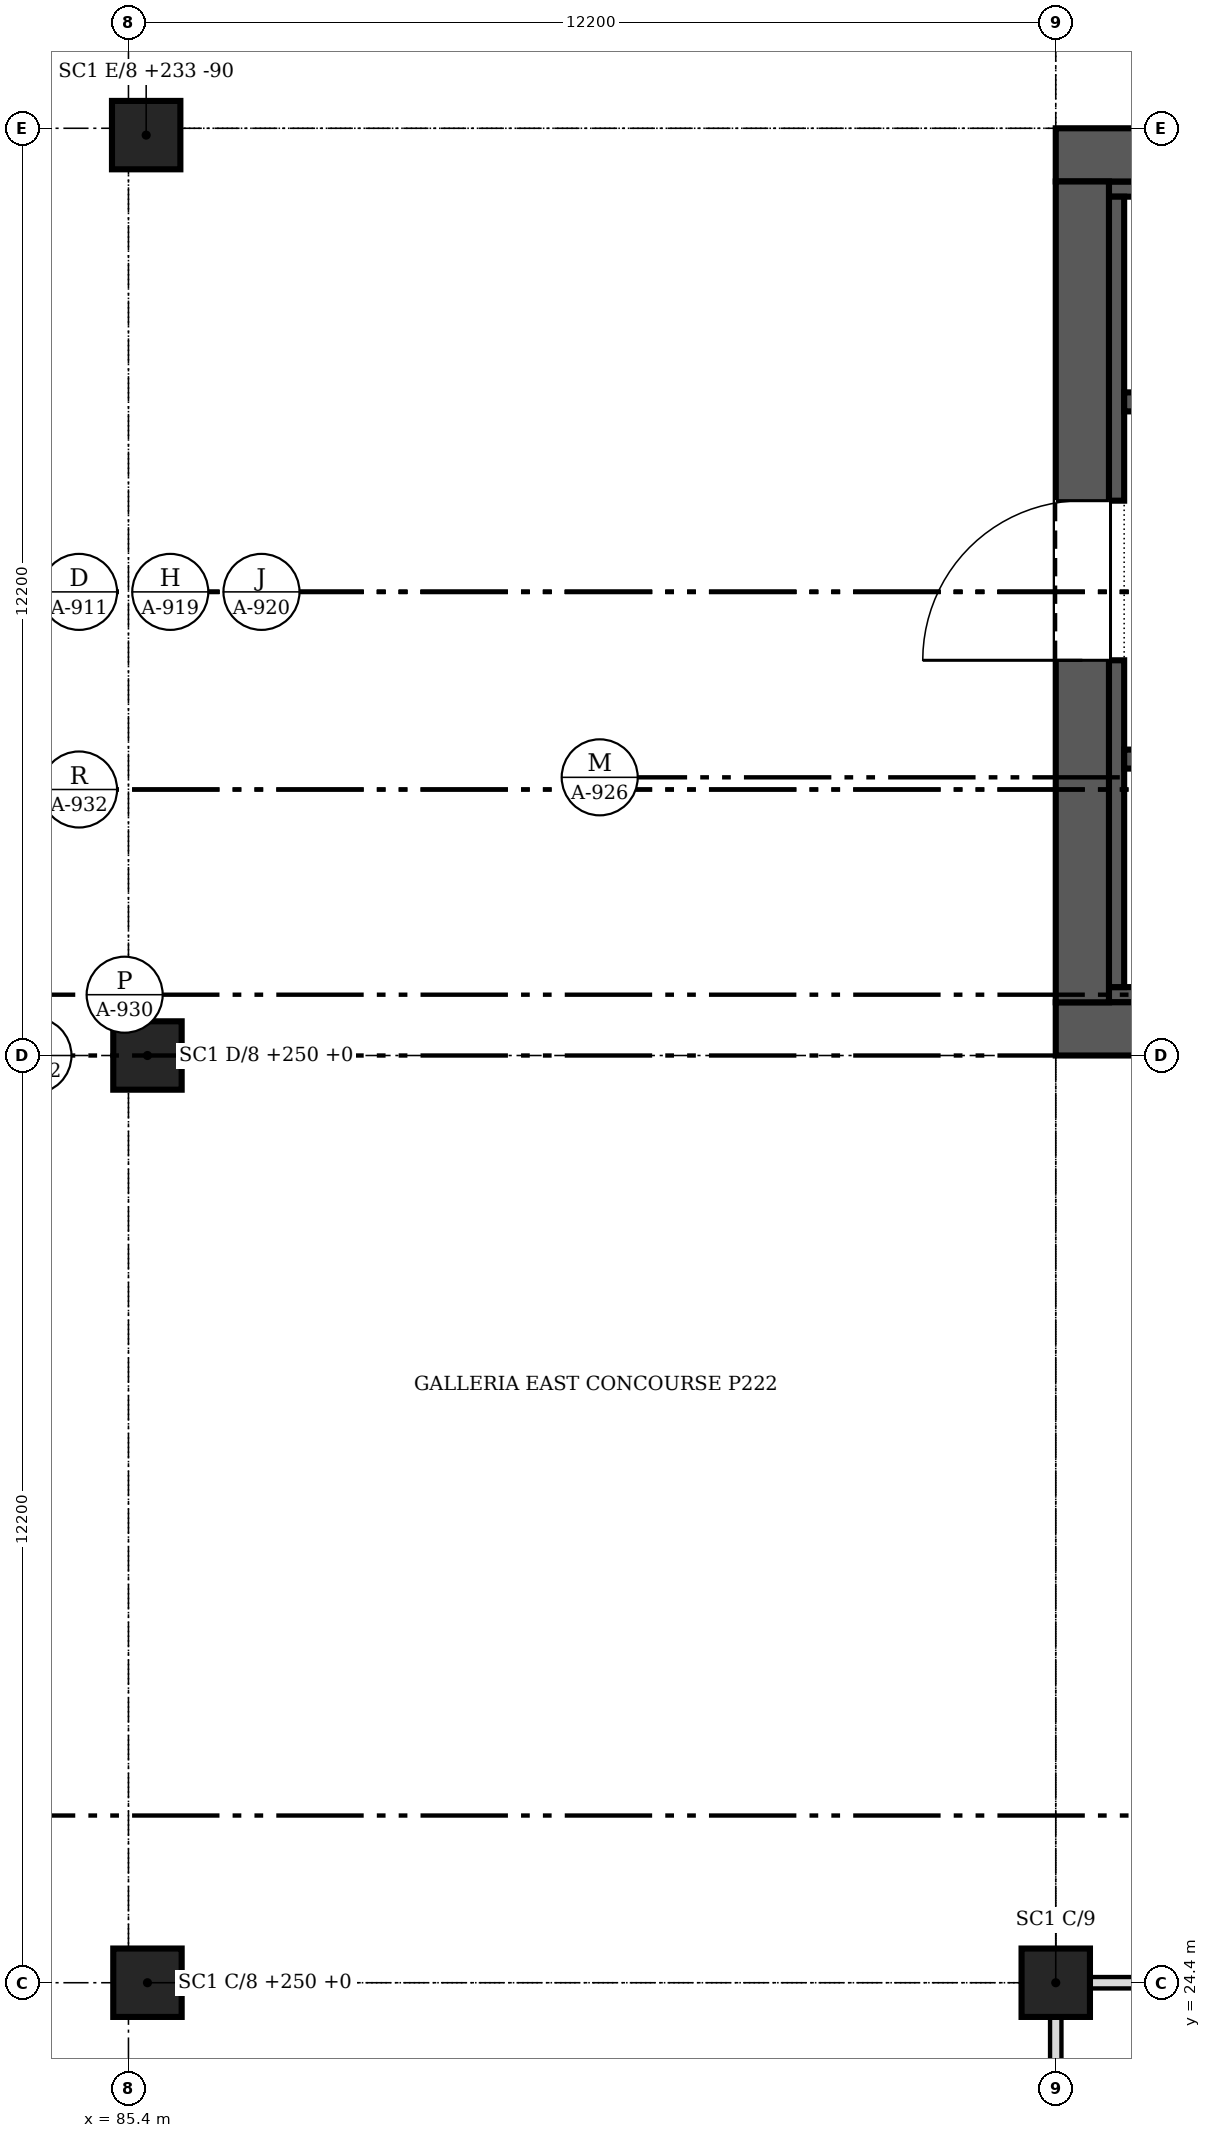
"""IFC4 building model, lengths in metres.
Left out: names, types, materials, properties, quantities, classifications, styles, units other than length and angle.
Written with IfcOpenShell. Run it as: python <this file> out.ifc"""

import sys

from ifc_helpers import new_model, si_unit, direction, frame, frame_2d, origin, origin_2d, place, context, subcontext, project, spatial, rectangle, extrude, source, transform, mapped, element, fill, save


model = new_model("IFC4")
c1 = context("Model", 3, precision=1e-05, world=origin(), true_north=direction((0.0, 1.0)))
c2 = subcontext(c1, "Body", "Model", "MODEL_VIEW")
j1 = project(units=[si_unit("LENGTHUNIT", "METRE"), si_unit("PLANEANGLEUNIT", "RADIAN")], contexts=[c1])
p1 = place(None, origin())
s1 = spatial("IfcSite", under=j1, at=p1, CompositionType="ELEMENT")
p2 = place(p1, origin())
s2 = spatial("IfcBuilding", under=s1, at=p2, CompositionType="ELEMENT")
p3 = place(p2, origin())
s3 = spatial("IfcBuildingStorey", under=s2, at=p3, CompositionType="ELEMENT", Elevation=0.0)
for number, where, z_axis, x_axis in (
    (1, (85.633, 48.71, 0.0), (0.0, 0.0, 1.0), (1.0, 0.0, 0.0)),
    (2, (85.65, 36.6, 0.0), (0.0, 0.0, 1.0), (1.0, 0.0, 0.0)),
    (3, (85.65, 24.4, 0.0), (0.0, 0.0, 1.0), (1.0, 0.0, 0.0)),
    (4, (97.6, 24.4, 0.0), (0.0, 0.0, 1.0), (1.0, 0.0, 0.0)),
):
    element("IfcColumn", number, at=place(p3, frame(where, z_axis=z_axis, x_axis=x_axis)), inside=s3, PredefinedType="COLUMN", context=c2, shape_type="SweptSolid", body=[
        extrude(rectangle(XDim=0.9, YDim=0.9, at=origin_2d()), origin(), (0.0, 0.0, 1.0), 6.95),
    ])
p4 = place(p3, frame((122.0, 36.95, 0.0), z_axis=(0.0, 0.0, 1.0), x_axis=(-1.0, 0.0, 0.0)))
e5 = element("IfcWall", 5, at=p4, inside=s3, PredefinedType="SHEAR", context=c2, shape_type="SweptSolid", body=[
    extrude(rectangle(XDim=24.4, YDim=0.7, at=frame_2d((12.2, 0.0))), origin(), (0.0, 0.0, 1.0), 7.2),
])
p5 = place(p3, frame((97.95, 37.3, 0.0), z_axis=(0.0, 0.0, 1.0), x_axis=(0.0, 1.0, 0.0)))
e6 = element("IfcWall", 6, at=p5, inside=s3, PredefinedType="SHEAR", context=c2, shape_type="SweptSolid", body=[
    extrude(rectangle(XDim=10.8, YDim=0.7, at=frame_2d((5.4, 0.0))), origin(), (0.0, 0.0, 1.0), 7.2),
])
m1 = source(origin(), c2, "Body", "SweptSolid", [
    extrude(rectangle(XDim=2.1, YDim=2.4, at=frame_2d((1.05, 1.2))), frame((0.0, 0.36, 0.0), z_axis=(0.0, -1.0, 0.0), x_axis=(1.0, 0.0, 0.0)), (0.0, 0.0, 1.0), 0.72),
])
p6 = place(p5, frame((4.5, 0.0, 0.0)))
e7 = element("IfcOpeningElement", 7, at=p6, cuts=e6, PredefinedType="OPENING", context=c2, shape_type="MappedRepresentation", body=[
    mapped(m1, transform((0.0, 0.0, 0.0), scale=1.0)),
])
p7 = place(p3, frame((97.6, 48.45, 0.0), z_axis=(0.0, 0.0, 1.0), x_axis=(1.0, 0.0, 0.0)))
e8 = element("IfcWall", 8, at=p7, inside=s3, PredefinedType="SHEAR", context=c2, shape_type="SweptSolid", body=[
    extrude(rectangle(XDim=24.4, YDim=0.7, at=frame_2d((12.2, 0.0))), origin(), (0.0, 0.0, 1.0), 7.2),
])
for number, where, z_axis, x_axis in (
    (9, (98.3, 37.4, 0.0), (0.0, 0.0, 1.0), (1.0, 0.0, 0.0)),
    (10, (98.3, 48.0, 0.0), (0.0, 0.0, 1.0), (1.0, 0.0, 0.0)),
):
    element("IfcWall", number, at=place(p3, frame(where, z_axis=z_axis, x_axis=x_axis)), inside=s3, PredefinedType="SOLIDWALL", context=c2, shape_type="SweptSolid", body=[
        extrude(rectangle(XDim=23.0, YDim=0.2, at=frame_2d((11.5, 0.0))), origin(), (0.0, 0.0, 1.0), 7.2),
    ])
p8 = place(p3, frame((98.4, 37.5, 0.0), z_axis=(0.0, 0.0, 1.0), x_axis=(0.0, 1.0, 0.0)))
e11 = element("IfcWall", 11, at=p8, inside=s3, PredefinedType="SOLIDWALL", context=c2, shape_type="SweptSolid", body=[
    extrude(rectangle(XDim=4.3, YDim=0.2, at=frame_2d((2.15, 0.0))), origin(), (0.0, 0.0, 1.0), 7.2),
])
p9 = place(p3, frame((98.4, 43.9, 0.0), z_axis=(0.0, 0.0, 1.0), x_axis=(0.0, 1.0, 0.0)))
e12 = element("IfcWall", 12, at=p9, inside=s3, PredefinedType="SOLIDWALL", context=c2, shape_type="SweptSolid", body=[
    extrude(rectangle(XDim=4.0, YDim=0.2, at=frame_2d((2.0, 0.0))), origin(), (0.0, 0.0, 1.0), 7.2),
])
p10 = place(p3, frame((98.5, 40.5, 0.0), z_axis=(0.0, 0.0, 1.0), x_axis=(1.0, 0.0, 0.0)))
e13 = element("IfcWall", 13, at=p10, inside=s3, PredefinedType="SOLIDWALL", context=c2, shape_type="SweptSolid", body=[
    extrude(rectangle(XDim=11.05, YDim=0.25, at=frame_2d((5.525, 0.0))), origin(), (0.0, 0.0, 1.0), 7.2),
])
m2 = source(origin(), c2, "Body", "SweptSolid", [
    extrude(rectangle(XDim=1.1, YDim=2.1, at=frame_2d((0.55, 1.05))), frame((0.0, 0.135, 0.0), z_axis=(0.0, -1.0, 0.0), x_axis=(1.0, 0.0, 0.0)), (0.0, 0.0, 1.0), 0.27),
])
p11 = place(p10, frame((0.863, 0.0, 0.0)))
e14 = element("IfcOpeningElement", 14, at=p11, cuts=e13, PredefinedType="OPENING", context=c2, shape_type="MappedRepresentation", body=[
    mapped(m2, transform((0.0, 0.0, 0.0), scale=1.0)),
])
p12 = place(p10, frame((3.688, 0.0, 0.0)))
e15 = element("IfcOpeningElement", 15, at=p12, cuts=e13, PredefinedType="OPENING", context=c2, shape_type="MappedRepresentation", body=[
    mapped(m2, transform((0.0, 0.0, 0.0), scale=1.0)),
])
m3 = source(origin(), c2, "Body", "SweptSolid", [
    extrude(rectangle(XDim=1.2, YDim=2.1, at=frame_2d((0.6, 1.05))), frame((0.0, 0.135, 0.0), z_axis=(0.0, -1.0, 0.0), x_axis=(1.0, 0.0, 0.0)), (0.0, 0.0, 1.0), 0.27),
])
p13 = place(p10, frame((6.462, 0.0, 0.0)))
e16 = element("IfcOpeningElement", 16, at=p13, cuts=e13, PredefinedType="OPENING", context=c2, shape_type="MappedRepresentation", body=[
    mapped(m3, transform((0.0, 0.0, 0.0), scale=1.0)),
])
p14 = place(p10, frame((9.288, 0.0, 0.0)))
e17 = element("IfcOpeningElement", 17, at=p14, cuts=e13, PredefinedType="OPENING", context=c2, shape_type="MappedRepresentation", body=[
    mapped(m3, transform((0.0, 0.0, 0.0), scale=1.0)),
])
p15 = place(p3, frame((109.55, 45.2, 0.0), z_axis=(0.0, 0.0, 1.0), x_axis=(-1.0, 0.0, 0.0)))
e18 = element("IfcWall", 18, at=p15, inside=s3, PredefinedType="SOLIDWALL", context=c2, shape_type="SweptSolid", body=[
    extrude(rectangle(XDim=11.05, YDim=0.25, at=frame_2d((5.525, 0.0))), origin(), (0.0, 0.0, 1.0), 7.2),
])
p16 = place(p15, frame((9.087, 0.0, 0.0)))
e19 = element("IfcOpeningElement", 19, at=p16, cuts=e18, PredefinedType="OPENING", context=c2, shape_type="MappedRepresentation", body=[
    mapped(m2, transform((0.0, 0.0, 0.0), scale=1.0)),
])
p17 = place(p15, frame((6.262, 0.0, 0.0)))
e20 = element("IfcOpeningElement", 20, at=p17, cuts=e18, PredefinedType="OPENING", context=c2, shape_type="MappedRepresentation", body=[
    mapped(m2, transform((0.0, 0.0, 0.0), scale=1.0)),
])
p18 = place(p15, frame((3.438, 0.0, 0.0)))
e21 = element("IfcOpeningElement", 21, at=p18, cuts=e18, PredefinedType="OPENING", context=c2, shape_type="MappedRepresentation", body=[
    mapped(m2, transform((0.0, 0.0, 0.0), scale=1.0)),
])
p19 = place(p15, frame((0.613, 0.0, 0.0)))
e22 = element("IfcOpeningElement", 22, at=p19, cuts=e18, PredefinedType="OPENING", context=c2, shape_type="MappedRepresentation", body=[
    mapped(m2, transform((0.0, 0.0, 0.0), scale=1.0)),
])
p20 = place(p3, frame((97.6, 19.451, 0.0), z_axis=(0.0, 0.0, 1.0), x_axis=(0.0, 1.0, 0.0)))
e23 = element("IfcWall", 23, at=p20, inside=s3, PredefinedType="PARTITIONING", context=c2, shape_type="SweptSolid", body=[
    extrude(rectangle(XDim=4.498, YDim=0.15, at=frame_2d((2.249, 0.0))), origin(), (0.0, 0.0, 1.0), 6.115),
])
p21 = place(p3, frame((109.349, 24.4, 0.0), z_axis=(0.0, 0.0, 1.0), x_axis=(-1.0, 0.0, 0.0)))
e24 = element("IfcWall", 24, at=p21, inside=s3, PredefinedType="PARTITIONING", context=c2, shape_type="SweptSolid", body=[
    extrude(rectangle(XDim=11.298, YDim=0.15, at=frame_2d((5.649, 0.0))), origin(), (0.0, 0.0, 1.0), 6.115),
])
m4 = source(origin(), c2, "Body", "SweptSolid", [
    extrude(rectangle(XDim=1.8, YDim=2.1, at=frame_2d((0.9, 1.05))), frame((0.0, 0.085, 0.0), z_axis=(0.0, -1.0, 0.0), x_axis=(1.0, 0.0, 0.0)), (0.0, 0.0, 1.0), 0.17),
])
p22 = place(p21, frame((4.798, 0.0, 0.0)))
e25 = element("IfcOpeningElement", 25, at=p22, cuts=e24, PredefinedType="OPENING", context=c2, shape_type="MappedRepresentation", body=[
    mapped(m4, transform((0.0, 0.0, 0.0), scale=1.0)),
])
m5 = source(origin(), c2, "Body", "SweptSolid", [
    extrude(rectangle(XDim=2.1, YDim=2.4, at=frame_2d((1.05, 1.2))), frame((0.0, 0.025, 0.0), z_axis=(0.0, -1.0, 0.0), x_axis=(1.0, 0.0, 0.0)), (0.0, 0.0, 1.0), 0.05),
])
p23 = place(p6, origin())
e26 = element("IfcDoor", 26, at=p23, inside=s3, OperationType="DOUBLE_DOOR_SINGLE_SWING", PredefinedType="DOOR", context=c2, shape_type="MappedRepresentation", body=[
    mapped(m5, transform((0.0, 0.0, 0.0), scale=1.0)),
])
fill(e7, e26)
save(model, sys.argv[1])
